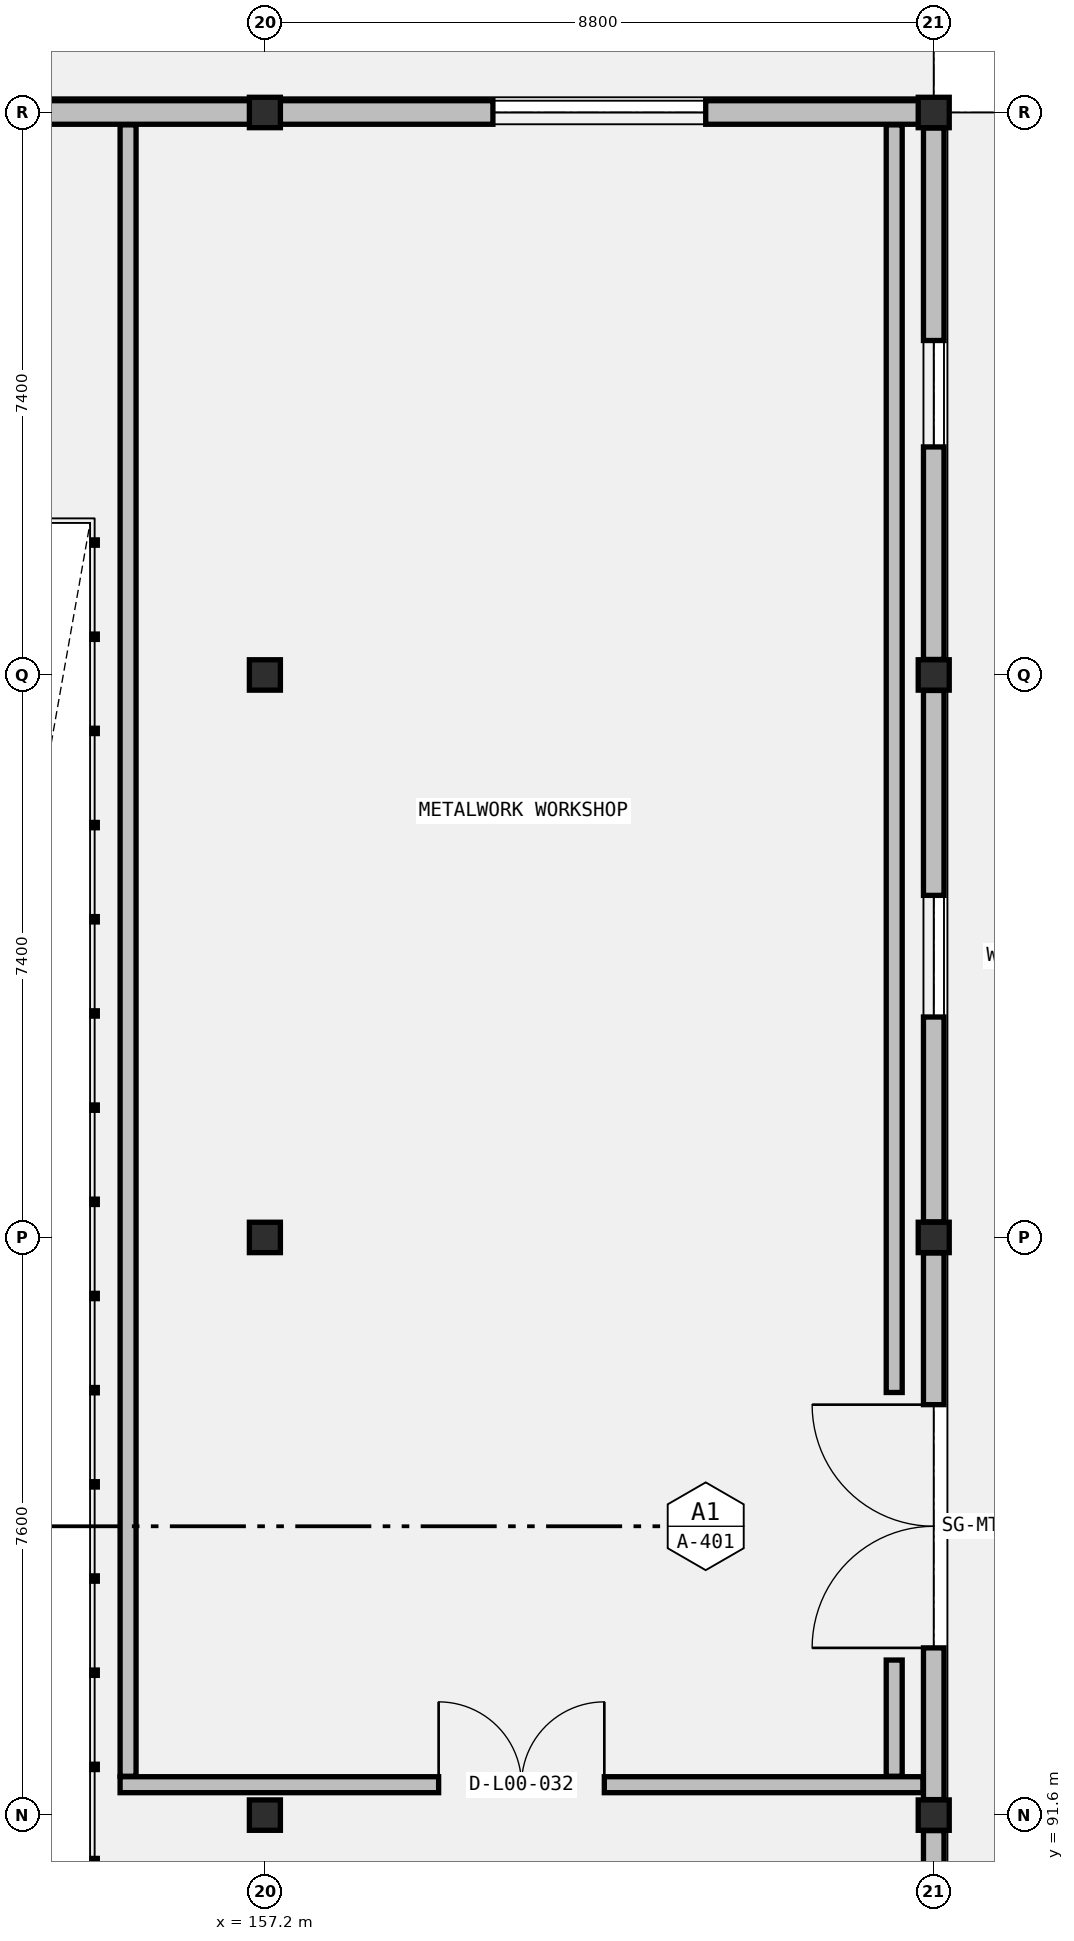
"""IFC4 building model, lengths in metres.
Left out: names, types, materials, properties, quantities, classifications, styles, units other than length and angle.
Written with IfcOpenShell. Run it as: python <this file> out.ifc"""

import sys

from ifc_helpers import new_model, si_unit, direction, frame, frame_2d, origin, origin_2d, place, context, subcontext, project, spatial, rectangle, i_section, extrude, element, fill, save


model = new_model("IFC4")
c1 = context("Model", 3, precision=1e-05, world=origin(), true_north=direction((0.0, 1.0)))
c2 = subcontext(c1, "Body", "Model", "MODEL_VIEW")
j1 = project(units=[si_unit("LENGTHUNIT", "METRE"), si_unit("PLANEANGLEUNIT", "RADIAN")], contexts=[c1])
p1 = place(None, origin())
s1 = spatial("IfcSite", under=j1, at=p1, CompositionType="ELEMENT")
p2 = place(p1, origin())
s2 = spatial("IfcBuilding", under=s1, at=p2, CompositionType="ELEMENT")
p3 = place(p2, origin())
s3 = spatial("IfcBuildingStorey", under=s2, at=p3, CompositionType="ELEMENT", Elevation=0.0)
for number, where, z_axis, x_axis in (
    (1, (157.2, 91.6, 0.0), (0.0, 0.0, 1.0), (1.0, 0.0, 0.0)),
    (2, (157.2, 99.2, 0.0), (0.0, 0.0, 1.0), (1.0, 0.0, 0.0)),
    (3, (157.2, 106.6, 0.0), (0.0, 0.0, 1.0), (1.0, 0.0, 0.0)),
    (4, (157.2, 114.0, 0.0), (0.0, 0.0, 1.0), (1.0, 0.0, 0.0)),
):
    element("IfcColumn", number, at=place(p3, frame(where, z_axis=z_axis, x_axis=x_axis)), inside=s3, PredefinedType="COLUMN", context=c2, shape_type="SweptSolid", body=[
        extrude(i_section(OverallWidth=0.408, OverallDepth=0.4, WebThickness=0.021, FlangeThickness=0.021, FilletRadius=0.022, at=origin_2d()), origin(), (0.0, 0.0, 1.0), 5.4),
    ])
for number, where, z_axis, x_axis in (
    (5, (166.0, 91.6, -0.3), (0.0, 0.0, 1.0), (1.0, 0.0, 0.0)),
    (6, (166.0, 99.2, -0.3), (0.0, 0.0, 1.0), (1.0, 0.0, 0.0)),
    (7, (166.0, 106.6, -0.3), (0.0, 0.0, 1.0), (1.0, 0.0, 0.0)),
    (8, (166.0, 114.0, -0.3), (0.0, 0.0, 1.0), (1.0, 0.0, 0.0)),
):
    element("IfcColumn", number, at=place(p3, frame(where, z_axis=z_axis, x_axis=x_axis)), inside=s3, PredefinedType="COLUMN", context=c2, shape_type="SweptSolid", body=[
        extrude(i_section(OverallWidth=0.408, OverallDepth=0.4, WebThickness=0.021, FlangeThickness=0.021, FilletRadius=0.022, at=origin_2d()), origin(), (0.0, 0.0, 1.0), 5.7),
    ])
p4 = place(p3, frame((148.414, 114.0, 0.0), z_axis=(0.0, 0.0, 1.0), x_axis=(1.0, 0.0, 0.0)))
e9 = element("IfcWall", 9, at=p4, inside=s3, PredefinedType="STANDARD", context=c2, shape_type="SweptSolid", body=[
    extrude(rectangle(XDim=8.773, YDim=0.31, at=frame_2d((4.386, 0.0))), origin(), (0.0, 0.0, 1.0), 4.55),
])
p5 = place(p4, frame((3.461, 0.0, 0.0)))
e10 = element("IfcOpeningElement", 10, at=p5, cuts=e9, PredefinedType="OPENING", context=c2, shape_type="SweptSolid", body=[
    extrude(rectangle(XDim=1.85, YDim=2.35, at=frame_2d((0.925, 1.175))), frame((0.0, 0.165, 0.0), z_axis=(0.0, -1.0, 0.0), x_axis=(1.0, 0.0, 0.0)), (0.0, 0.0, 1.0), 0.33),
])
p6 = place(p3, frame((157.213, 114.0, 0.0), z_axis=(0.0, 0.0, 1.0), x_axis=(1.0, 0.0, 0.0)))
e11 = element("IfcWall", 11, at=p6, inside=s3, PredefinedType="STANDARD", context=c2, shape_type="SweptSolid", body=[
    extrude(rectangle(XDim=8.773, YDim=0.31, at=frame_2d((4.387, 0.0))), origin(), (0.0, 0.0, 1.0), 4.55),
])
p7 = place(p6, frame((2.987, 0.0, 0.9)))
e12 = element("IfcOpeningElement", 12, at=p7, cuts=e11, PredefinedType="OPENING", context=c2, shape_type="SweptSolid", body=[
    extrude(rectangle(XDim=2.8, YDim=1.5, at=frame_2d((1.4, 0.75))), frame((0.0, 0.165, 0.0), z_axis=(0.0, -1.0, 0.0), x_axis=(1.0, 0.0, 0.0)), (0.0, 0.0, 1.0), 0.33),
])
p8 = place(p3, frame((166.0, 84.204, 0.0), z_axis=(0.0, 0.0, 1.0), x_axis=(0.0, 1.0, 0.0)))
e13 = element("IfcWall", 13, at=p8, inside=s3, PredefinedType="STANDARD", context=c2, shape_type="SweptSolid", body=[
    extrude(rectangle(XDim=7.192, YDim=0.27, at=frame_2d((3.596, 0.0))), origin(), (0.0, 0.0, 1.0), 4.55),
])
p9 = place(p8, frame((2.296, 0.0, 0.9)))
e14 = element("IfcOpeningElement", 14, at=p9, cuts=e13, PredefinedType="OPENING", context=c2, shape_type="SweptSolid", body=[
    extrude(rectangle(XDim=2.6, YDim=2.2, at=frame_2d((1.3, 1.1))), frame((0.0, 0.145, 0.0), z_axis=(0.0, -1.0, 0.0), x_axis=(1.0, 0.0, 0.0)), (0.0, 0.0, 1.0), 0.29),
])
p10 = place(p3, frame((166.0, 91.804, 0.0), z_axis=(0.0, 0.0, 1.0), x_axis=(0.0, 1.0, 0.0)))
e15 = element("IfcWall", 15, at=p10, inside=s3, PredefinedType="STANDARD", context=c2, shape_type="SweptSolid", body=[
    extrude(rectangle(XDim=7.192, YDim=0.27, at=frame_2d((3.596, 0.0))), origin(), (0.0, 0.0, 1.0), 4.55),
])
p11 = place(p10, frame((1.996, 0.0, 0.0)))
e16 = element("IfcOpeningElement", 16, at=p11, cuts=e15, PredefinedType="OPENING", context=c2, shape_type="SweptSolid", body=[
    extrude(rectangle(XDim=3.2, YDim=3.2, at=frame_2d((1.6, 1.6))), frame((0.0, 0.145, 0.0), z_axis=(0.0, -1.0, 0.0), x_axis=(1.0, 0.0, 0.0)), (0.0, 0.0, 1.0), 0.29),
])
p12 = place(p3, frame((166.0, 99.404, 0.0), z_axis=(0.0, 0.0, 1.0), x_axis=(0.0, 1.0, 0.0)))
e17 = element("IfcWall", 17, at=p12, inside=s3, PredefinedType="STANDARD", context=c2, shape_type="SweptSolid", body=[
    extrude(rectangle(XDim=6.992, YDim=0.27, at=frame_2d((3.496, 0.0))), origin(), (0.0, 0.0, 1.0), 4.55),
])
p13 = place(p12, frame((2.696, 0.0, 0.9)))
e18 = element("IfcOpeningElement", 18, at=p13, cuts=e17, PredefinedType="OPENING", context=c2, shape_type="SweptSolid", body=[
    extrude(rectangle(XDim=1.6, YDim=1.8, at=frame_2d((0.8, 0.9))), frame((0.0, 0.145, 0.0), z_axis=(0.0, -1.0, 0.0), x_axis=(1.0, 0.0, 0.0)), (0.0, 0.0, 1.0), 0.29),
])
p14 = place(p3, frame((166.0, 106.804, 0.0), z_axis=(0.0, 0.0, 1.0), x_axis=(0.0, 1.0, 0.0)))
e19 = element("IfcWall", 19, at=p14, inside=s3, PredefinedType="STANDARD", context=c2, shape_type="SweptSolid", body=[
    extrude(rectangle(XDim=6.992, YDim=0.27, at=frame_2d((3.496, 0.0))), origin(), (0.0, 0.0, 1.0), 4.55),
])
p15 = place(p14, frame((2.796, 0.0, 0.9)))
e20 = element("IfcOpeningElement", 20, at=p15, cuts=e19, PredefinedType="OPENING", context=c2, shape_type="SweptSolid", body=[
    extrude(rectangle(XDim=1.4, YDim=1.2, at=frame_2d((0.7, 0.6))), frame((0.0, 0.145, 0.0), z_axis=(0.0, -1.0, 0.0), x_axis=(1.0, 0.0, 0.0)), (0.0, 0.0, 1.0), 0.29),
])
p16 = place(p3, frame((155.295, 92.0, 0.0), z_axis=(0.0, 0.0, 1.0), x_axis=(1.0, 0.0, 0.0)))
e21 = element("IfcWall", 21, at=p16, inside=s3, PredefinedType="PARTITIONING", context=c2, shape_type="SweptSolid", body=[
    extrude(rectangle(XDim=10.562, YDim=0.21, at=frame_2d((5.281, 0.0))), origin(), (0.0, 0.0, 1.0), 4.748),
])
p17 = place(p16, frame((4.191, 0.0, 0.0)))
e22 = element("IfcOpeningElement", 22, at=p17, cuts=e21, PredefinedType="OPENING", context=c2, shape_type="SweptSolid", body=[
    extrude(rectangle(XDim=2.18, YDim=2.58, at=frame_2d((1.09, 1.29))), frame((0.0, 0.115, 0.0), z_axis=(0.0, -1.0, 0.0), x_axis=(1.0, 0.0, 0.0)), (0.0, 0.0, 1.0), 0.23),
])
p18 = place(p3, frame((165.48, 92.111, 0.0), z_axis=(0.0, 0.0, 1.0), x_axis=(0.0, 1.0, 0.0)))
e23 = element("IfcWall", 23, at=p18, inside=s3, PredefinedType="PARTITIONING", context=c2, shape_type="SweptSolid", body=[
    extrude(rectangle(XDim=1.529, YDim=0.21, at=frame_2d((0.764, 0.0))), origin(), (0.0, 0.0, 1.0), 5.16),
])
p19 = place(p3, frame((155.4, 92.111, 0.0), z_axis=(0.0, 0.0, 1.0), x_axis=(0.0, 1.0, 0.0)))
e24 = element("IfcWall", 24, at=p19, inside=s3, PredefinedType="PARTITIONING", context=c2, shape_type="SweptSolid", body=[
    extrude(rectangle(XDim=21.726, YDim=0.21, at=frame_2d((10.863, 0.0))), origin(), (0.0, 0.0, 1.0), 4.55),
])
p20 = place(p3, frame((165.48, 97.16, 0.0), z_axis=(0.0, 0.0, 1.0), x_axis=(0.0, 1.0, 0.0)))
e25 = element("IfcWall", 25, at=p20, inside=s3, PredefinedType="PARTITIONING", context=c2, shape_type="SweptSolid", body=[
    extrude(rectangle(XDim=16.677, YDim=0.21, at=frame_2d((8.338, 0.0))), origin(), (0.0, 0.0, 1.0), 4.55),
])
p21 = place(p7, origin())
e26 = element("IfcWindow", 26, at=p21, inside=s3, PartitioningType="TRIPLE_PANEL_VERTICAL", PredefinedType="WINDOW", context=c2, shape_type="SweptSolid", body=[
    extrude(rectangle(XDim=2.8, YDim=1.5, at=frame_2d((1.4, 0.75))), frame((0.0, 0.03, 0.0), z_axis=(0.0, -1.0, 0.0), x_axis=(1.0, 0.0, 0.0)), (0.0, 0.0, 1.0), 0.06),
])
fill(e12, e26)
p22 = place(p11, origin())
e27 = element("IfcDoor", 27, at=p22, inside=s3, OperationType="DOUBLE_DOOR_SINGLE_SWING", PredefinedType="GATE", context=c2, shape_type="SweptSolid", body=[
    extrude(rectangle(XDim=3.2, YDim=3.2, at=frame_2d((1.6, 1.6))), frame((0.0, 0.025, 0.0), z_axis=(0.0, -1.0, 0.0), x_axis=(1.0, 0.0, 0.0)), (0.0, 0.0, 1.0), 0.05),
])
fill(e16, e27)
p23 = place(p13, origin())
e28 = element("IfcWindow", 28, at=p23, inside=s3, PartitioningType="DOUBLE_PANEL_VERTICAL", PredefinedType="WINDOW", context=c2, shape_type="SweptSolid", body=[
    extrude(rectangle(XDim=1.6, YDim=1.8, at=frame_2d((0.8, 0.9))), frame((0.0, 0.03, 0.0), z_axis=(0.0, -1.0, 0.0), x_axis=(1.0, 0.0, 0.0)), (0.0, 0.0, 1.0), 0.06),
])
fill(e18, e28)
p24 = place(p15, origin())
e29 = element("IfcWindow", 29, at=p24, inside=s3, PartitioningType="SINGLE_PANEL", PredefinedType="WINDOW", context=c2, shape_type="SweptSolid", body=[
    extrude(rectangle(XDim=1.4, YDim=1.2, at=frame_2d((0.7, 0.6))), frame((0.0, 0.03, 0.0), z_axis=(0.0, -1.0, 0.0), x_axis=(1.0, 0.0, 0.0)), (0.0, 0.0, 1.0), 0.06),
])
fill(e20, e29)
p25 = place(p17, origin())
e30 = element("IfcDoor", 30, at=p25, inside=s3, OperationType="DOUBLE_DOOR_SINGLE_SWING", PredefinedType="DOOR", context=c2, shape_type="SweptSolid", body=[
    extrude(rectangle(XDim=2.18, YDim=2.58, at=frame_2d((1.09, 1.29))), frame((0.0, 0.025, 0.0), z_axis=(0.0, -1.0, 0.0), x_axis=(1.0, 0.0, 0.0)), (0.0, 0.0, 1.0), 0.05),
])
fill(e22, e30)
save(model, sys.argv[1])
